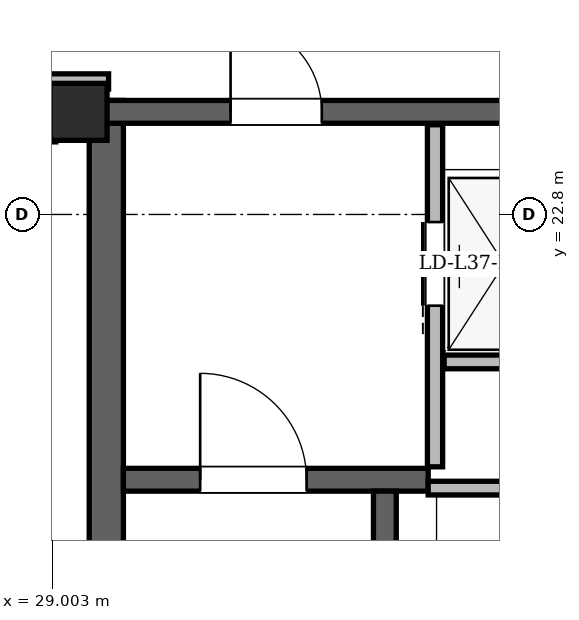
"""IFC4 building model, lengths in metres.
Left out: names, types, materials, properties, quantities, classifications, styles, units other than length and angle.
Written with IfcOpenShell. Run it as: python <this file> out.ifc"""

import sys

from ifc_helpers import new_model, si_unit, direction, frame, frame_2d, origin, origin_2d, place, context, subcontext, project, spatial, rectangle, hollow_rectangle, extrude, element, fill, save


model = new_model("IFC4")
c1 = context("Model", 3, precision=1e-05, world=origin(), true_north=direction((0.0, 1.0)))
c2 = subcontext(c1, "Body", "Model", "MODEL_VIEW")
j1 = project(units=[si_unit("LENGTHUNIT", "METRE"), si_unit("PLANEANGLEUNIT", "RADIAN")], contexts=[c1])
p1 = place(None, origin())
s1 = spatial("IfcSite", under=j1, at=p1, CompositionType="ELEMENT")
p2 = place(p1, origin())
s2 = spatial("IfcBuilding", under=s1, at=p2, CompositionType="ELEMENT")
p3 = place(p2, frame((0.0, 0.0, 142.2)))
s3 = spatial("IfcBuildingStorey", under=s2, at=p3, CompositionType="ELEMENT", Elevation=142.2)
p4 = place(p3, frame((29.35, 24.15, 0.0), z_axis=(0.0, 0.0, 1.0), x_axis=(1.0, 0.0, 0.0)))
e1 = element("IfcColumn", 1, at=p4, inside=s3, PredefinedType="COLUMN", context=c2, shape_type="SweptSolid", body=[
    extrude(hollow_rectangle(XDim=0.75, YDim=0.75, WallThickness=0.06, at=origin_2d()), origin(), (0.0, 0.0, 1.0), 3.6),
])
p5 = place(p3, frame((29.715, 11.0, 0.0), z_axis=(0.0, 0.0, 1.0), x_axis=(0.0, 1.0, 0.0)))
e2 = element("IfcWall", 2, at=p5, inside=s3, PredefinedType="SHEAR", context=c2, shape_type="SweptSolid", body=[
    extrude(rectangle(XDim=13.3, YDim=0.45, at=frame_2d((6.65, 0.0))), origin(), (0.0, 0.0, 1.0), 3.36),
])
p6 = place(p3, frame((29.65, 24.15, 0.0), z_axis=(0.0, 0.0, 1.0), x_axis=(1.0, 0.0, 0.0)))
e3 = element("IfcWall", 3, at=p6, inside=s3, PredefinedType="SHEAR", context=c2, shape_type="SweptSolid", body=[
    extrude(rectangle(XDim=15.7, YDim=0.3, at=frame_2d((7.85, 0.0))), origin(), (0.0, 0.0, 1.0), 3.36),
])
p7 = place(p6, frame((1.7, 0.0, 0.0)))
e4 = element("IfcOpeningElement", 4, at=p7, cuts=e3, PredefinedType="OPENING", context=c2, shape_type="SweptSolid", body=[
    extrude(rectangle(XDim=1.2, YDim=2.2, at=frame_2d((0.6, 1.1))), frame((0.0, 0.15, 0.0), z_axis=(0.0, -1.0, 0.0), x_axis=(1.0, 0.0, 0.0)), (0.0, 0.0, 1.0), 0.3),
])
p8 = place(p6, frame((12.8, 0.0, 0.0)))
e5 = element("IfcOpeningElement", 5, at=p8, cuts=e3, PredefinedType="OPENING", context=c2, shape_type="SweptSolid", body=[
    extrude(rectangle(XDim=1.2, YDim=2.2, at=frame_2d((0.6, 1.1))), frame((0.0, 0.15, 0.0), z_axis=(0.0, -1.0, 0.0), x_axis=(1.0, 0.0, 0.0)), (0.0, 0.0, 1.0), 0.3),
])
p9 = place(p6, frame((7.4, 0.0, 0.0)))
e6 = element("IfcOpeningElement", 6, at=p9, cuts=e3, PredefinedType="OPENING", context=c2, shape_type="SweptSolid", body=[
    extrude(rectangle(XDim=0.9, YDim=2.05, at=frame_2d((0.45, 1.025))), frame((0.0, 0.15, 0.0), z_axis=(0.0, -1.0, 0.0), x_axis=(1.0, 0.0, 0.0)), (0.0, 0.0, 1.0), 0.3),
])
p10 = place(p3, frame((29.94, 19.31, 0.0), z_axis=(0.0, 0.0, 1.0), x_axis=(1.0, 0.0, 0.0)))
e7 = element("IfcWall", 7, at=p10, inside=s3, PredefinedType="SHEAR", context=c2, shape_type="SweptSolid", body=[
    extrude(rectangle(XDim=4.01, YDim=0.3, at=frame_2d((2.005, 0.0))), origin(), (0.0, 0.0, 1.0), 3.36),
])
p11 = place(p10, frame((1.01, 0.0, 0.0)))
e8 = element("IfcOpeningElement", 8, at=p11, cuts=e7, PredefinedType="OPENING", context=c2, shape_type="SweptSolid", body=[
    extrude(rectangle(XDim=1.4, YDim=2.2, at=frame_2d((0.7, 1.1))), frame((0.0, 0.15, 0.0), z_axis=(0.0, -1.0, 0.0), x_axis=(1.0, 0.0, 0.0)), (0.0, 0.0, 1.0), 0.3),
])
p12 = place(p3, frame((33.38, 11.54, 0.0), z_axis=(0.0, 0.0, 1.0), x_axis=(0.0, 1.0, 0.0)))
e9 = element("IfcWall", 9, at=p12, inside=s3, PredefinedType="SHEAR", context=c2, shape_type="SweptSolid", body=[
    extrude(rectangle(XDim=7.62, YDim=0.3, at=frame_2d((3.81, 0.0))), origin(), (0.0, 0.0, 1.0), 3.36),
])
p13 = place(p3, frame((32.564, 43.35, 0.0), z_axis=(0.0, 0.0, 1.0), x_axis=(-0.500002563111, -0.866023923966, 0.0)))
e10 = element("IfcWall", 10, at=p13, inside=s3, PredefinedType="SOLIDWALL", context=c2, shape_type="SweptSolid", body=[
    extrude(rectangle(XDim=35.334, YDim=0.34, at=frame_2d((17.667, 0.0))), origin(), (0.0, 0.0, 1.0), 2.58),
])
p14 = place(p13, frame((8.034, 0.0, 0.0)))
e11 = element("IfcOpeningElement", 11, at=p14, cuts=e10, PredefinedType="OPENING", context=c2, shape_type="SweptSolid", body=[
    extrude(rectangle(XDim=1.5, YDim=2.2, at=frame_2d((0.75, 1.1))), frame((0.0, 0.17, 0.0), z_axis=(0.0, -1.0, 0.0), x_axis=(1.0, 0.0, 0.0)), (0.0, 0.0, 1.0), 0.34),
])
p15 = place(p13, frame((26.835, 0.0, 0.0)))
e12 = element("IfcOpeningElement", 12, at=p15, cuts=e10, PredefinedType="OPENING", context=c2, shape_type="SweptSolid", body=[
    extrude(rectangle(XDim=1.5, YDim=2.2, at=frame_2d((0.75, 1.1))), frame((0.0, 0.17, 0.0), z_axis=(0.0, -1.0, 0.0), x_axis=(1.0, 0.0, 0.0)), (0.0, 0.0, 1.0), 0.34),
])
p16 = place(p13, frame((22.185, 0.0, 0.85)))
e13 = element("IfcOpeningElement", 13, at=p16, cuts=e10, PredefinedType="OPENING", context=c2, shape_type="SweptSolid", body=[
    extrude(rectangle(XDim=1.2, YDim=1.48, at=frame_2d((0.6, 0.74))), frame((0.0, 0.17, 0.0), z_axis=(0.0, -1.0, 0.0), x_axis=(1.0, 0.0, 0.0)), (0.0, 0.0, 1.0), 0.34),
])
p17 = place(p13, frame((2.318, 0.0, 0.85)))
e14 = element("IfcOpeningElement", 14, at=p17, cuts=e10, PredefinedType="OPENING", context=c2, shape_type="SweptSolid", body=[
    extrude(rectangle(XDim=1.6, YDim=1.62, at=frame_2d((0.8, 0.81))), frame((0.0, 0.17, 0.0), z_axis=(0.0, -1.0, 0.0), x_axis=(1.0, 0.0, 0.0)), (0.0, 0.0, 1.0), 0.34),
])
p18 = place(p13, frame((12.959, 0.0, 0.85)))
e15 = element("IfcOpeningElement", 15, at=p18, cuts=e10, PredefinedType="OPENING", context=c2, shape_type="SweptSolid", body=[
    extrude(rectangle(XDim=3.0, YDim=1.62, at=frame_2d((1.5, 0.81))), frame((0.0, 0.17, 0.0), z_axis=(0.0, -1.0, 0.0), x_axis=(1.0, 0.0, 0.0)), (0.0, 0.0, 1.0), 0.34),
])
p19 = place(p13, frame((20.293, 0.0, 0.85)))
e16 = element("IfcOpeningElement", 16, at=p19, cuts=e10, PredefinedType="OPENING", context=c2, shape_type="SweptSolid", body=[
    extrude(rectangle(XDim=1.2, YDim=1.48, at=frame_2d((0.6, 0.74))), frame((0.0, 0.17, 0.0), z_axis=(0.0, -1.0, 0.0), x_axis=(1.0, 0.0, 0.0)), (0.0, 0.0, 1.0), 0.34),
])
p20 = place(p13, frame((33.535, 0.0, 0.85)))
e17 = element("IfcOpeningElement", 17, at=p20, cuts=e10, PredefinedType="OPENING", context=c2, shape_type="SweptSolid", body=[
    extrude(rectangle(XDim=1.2, YDim=1.48, at=frame_2d((0.6, 0.74))), frame((0.0, 0.17, 0.0), z_axis=(0.0, -1.0, 0.0), x_axis=(1.0, 0.0, 0.0)), (0.0, 0.0, 1.0), 0.34),
])
p21 = place(p3, frame((34.04, 19.48, 0.0), z_axis=(0.0, 0.0, 1.0), x_axis=(0.0, 1.0, 0.0)))
e18 = element("IfcWall", 18, at=p21, inside=s3, PredefinedType="PARTITIONING", context=c2, shape_type="SweptSolid", body=[
    extrude(rectangle(XDim=4.5, YDim=0.2, at=frame_2d((2.25, 0.0))), origin(), (0.0, 0.0, 1.0), 2.4),
])
p22 = place(p21, frame((2.12, 0.0, 0.0)))
e19 = element("IfcOpeningElement", 19, at=p22, cuts=e18, PredefinedType="OPENING", context=c2, shape_type="SweptSolid", body=[
    extrude(rectangle(XDim=1.1, YDim=2.2, at=frame_2d((0.55, 1.1))), frame((0.0, 0.1, 0.0), z_axis=(0.0, -1.0, 0.0), x_axis=(1.0, 0.0, 0.0)), (0.0, 0.0, 1.0), 0.2),
])
p23 = place(p3, frame((34.16, 20.86, 0.0), z_axis=(0.0, 0.0, 1.0), x_axis=(1.0, 0.0, 0.0)))
e20 = element("IfcWall", 20, at=p23, inside=s3, PredefinedType="PARTITIONING", context=c2, shape_type="SweptSolid", body=[
    extrude(rectangle(XDim=1.58, YDim=0.18, at=frame_2d((0.79, 0.0))), origin(), (0.0, 0.0, 1.0), 3.36),
])
p24 = place(p3, frame((33.95, 19.2, 0.0), z_axis=(0.0, 0.0, 1.0), x_axis=(1.0, 0.0, 0.0)))
e21 = element("IfcWall", 21, at=p24, inside=s3, PredefinedType="PARTITIONING", context=c2, shape_type="SweptSolid", body=[
    extrude(rectangle(XDim=2.27, YDim=0.18, at=frame_2d((1.135, 0.0))), origin(), (0.0, 0.0, 1.0), 3.36),
])
p25 = place(p3, frame((28.955, 24.55, 0.0), z_axis=(0.0, 0.0, 1.0), x_axis=(1.0, 0.0, 0.0)))
e22 = element("IfcWall", 22, at=p25, inside=s3, PredefinedType="PARTITIONING", context=c2, shape_type="SweptSolid", body=[
    extrude(rectangle(XDim=0.79, YDim=0.2, at=frame_2d((0.395, 0.0))), origin(), (0.0, 0.0, 1.0), 2.822),
])
p26 = place(p3, frame((28.95, 23.755, 0.0), z_axis=(0.0, 0.0, 1.0), x_axis=(0.0, 1.0, 0.0)))
e23 = element("IfcWall", 23, at=p26, inside=s3, PredefinedType="PARTITIONING", context=c2, shape_type="SweptSolid", body=[
    extrude(rectangle(XDim=0.565, YDim=0.2, at=frame_2d((0.283, 0.0))), origin(), (0.0, 0.0, 1.0), 3.36),
])
p27 = place(p22, origin())
e24 = element("IfcDoor", 24, at=p27, inside=s3, OperationType="SLIDING_TO_LEFT", PredefinedType="DOOR", context=c2, shape_type="SweptSolid", body=[
    extrude(rectangle(XDim=1.1, YDim=2.2, at=frame_2d((0.55, 1.1))), frame((0.0, 0.025, 0.0), z_axis=(0.0, -1.0, 0.0), x_axis=(1.0, 0.0, 0.0)), (0.0, 0.0, 1.0), 0.05),
])
fill(e19, e24)
p28 = place(p11, origin())
e25 = element("IfcDoor", 25, at=p28, inside=s3, OperationType="SINGLE_SWING_LEFT", PredefinedType="DOOR", context=c2, shape_type="SweptSolid", body=[
    extrude(rectangle(XDim=1.4, YDim=2.2, at=frame_2d((0.7, 1.1))), frame((0.0, 0.025, 0.0), z_axis=(0.0, -1.0, 0.0), x_axis=(1.0, 0.0, 0.0)), (0.0, 0.0, 1.0), 0.05),
])
fill(e8, e25)
p29 = place(p7, origin())
e26 = element("IfcDoor", 26, at=p29, inside=s3, OperationType="SINGLE_SWING_LEFT", PredefinedType="DOOR", context=c2, shape_type="SweptSolid", body=[
    extrude(rectangle(XDim=1.2, YDim=2.2, at=frame_2d((0.6, 1.1))), frame((0.0, 0.025, 0.0), z_axis=(0.0, -1.0, 0.0), x_axis=(1.0, 0.0, 0.0)), (0.0, 0.0, 1.0), 0.05),
])
fill(e4, e26)
save(model, sys.argv[1])
